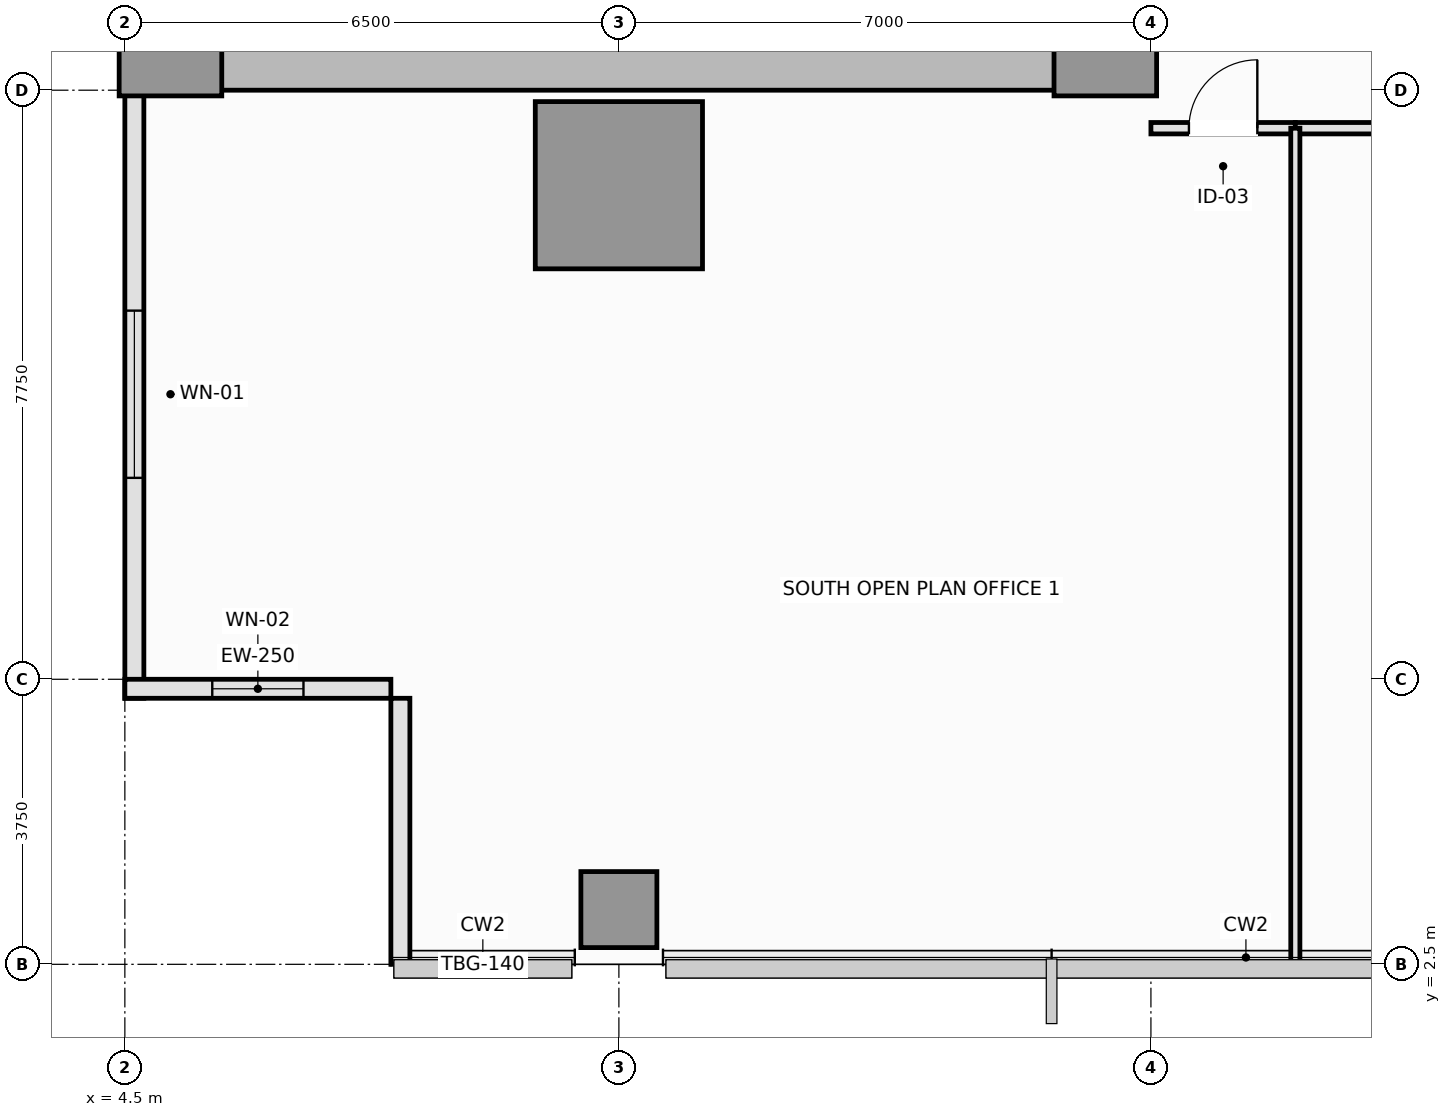
"""IFC4 building model, lengths in metres.
Left out: names, types, materials, properties, quantities, classifications, styles, units other than length and angle.
Written with IfcOpenShell. Run it as: python <this file> out.ifc"""

import sys

from ifc_helpers import new_model, si_unit, direction, frame, frame_2d, origin, origin_2d, place, context, subcontext, project, spatial, rectangle, extrude, element, fill, save


model = new_model("IFC4")
c1 = context("Model", 3, precision=1e-05, world=origin(), true_north=direction((0.0, 1.0)))
c2 = subcontext(c1, "Body", "Model", "MODEL_VIEW")
j1 = project(units=[si_unit("LENGTHUNIT", "METRE"), si_unit("PLANEANGLEUNIT", "RADIAN")], contexts=[c1])
p1 = place(None, origin())
s1 = spatial("IfcSite", under=j1, at=p1, CompositionType="ELEMENT")
p2 = place(p1, origin())
s2 = spatial("IfcBuilding", under=s1, at=p2, CompositionType="ELEMENT")
p3 = place(p2, frame((0.0, 0.0, 85.95)))
s3 = spatial("IfcBuildingStorey", under=s2, at=p3, CompositionType="ELEMENT", Elevation=85.95)
p4 = place(p3, frame((4.5, 14.4, 0.0), z_axis=(0.0, 0.0, 1.0), x_axis=(1.0, 0.0, 0.0)))
e1 = element("IfcWall", 1, at=p4, inside=s3, PredefinedType="SHEAR", context=c2, shape_type="SweptSolid", body=[
    extrude(rectangle(XDim=13.5, YDim=0.8, at=frame_2d((6.75, 0.0))), origin(), (0.0, 0.0, 1.0), 3.55),
])
for number, where, z_axis, x_axis in (
    (2, (5.1, 14.6, 0.0), (0.0, 0.0, 1.0), (1.0, 0.0, 0.0)),
    (3, (17.4, 14.6, 0.0), (0.0, 0.0, 1.0), (1.0, 0.0, 0.0)),
):
    element("IfcColumn", number, at=place(p3, frame(where, z_axis=z_axis, x_axis=x_axis)), inside=s3, PredefinedType="PILASTER", context=c2, shape_type="SweptSolid", body=[
        extrude(rectangle(XDim=1.35, YDim=1.35, at=origin_2d()), origin(), (0.0, 0.0, 1.0), 3.55),
    ])
p5 = place(p3, frame((11.0, 12.75, 0.0), z_axis=(0.0, 0.0, 1.0), x_axis=(1.0, 0.0, 0.0)))
e4 = element("IfcColumn", 4, at=p5, inside=s3, PredefinedType="COLUMN", context=c2, shape_type="SweptSolid", body=[
    extrude(rectangle(XDim=2.2, YDim=2.2, at=origin_2d()), origin(), (0.0, 0.0, 1.0), 3.55),
])
p6 = place(p3, frame((11.0, 3.22, 0.0), z_axis=(0.0, 0.0, 1.0), x_axis=(1.0, 0.0, 0.0)))
e5 = element("IfcColumn", 5, at=p6, inside=s3, PredefinedType="COLUMN", context=c2, shape_type="SweptSolid", body=[
    extrude(rectangle(XDim=1.0, YDim=1.0, at=origin_2d()), origin(), (0.0, 0.0, 1.0), 3.55),
])
p7 = place(p3, frame((4.625, 14.0, 0.0), z_axis=(0.0, 0.0, 1.0), x_axis=(0.0, -1.0, 0.0)))
e6 = element("IfcWall", 6, at=p7, inside=s3, PredefinedType="SOLIDWALL", context=c2, shape_type="SweptSolid", body=[
    extrude(rectangle(XDim=8.0, YDim=0.25, at=frame_2d((4.0, 0.0))), origin(), (0.0, 0.0, 1.0), 3.37),
])
p8 = place(p7, frame((2.9, 0.0, 0.9)))
e7 = element("IfcOpeningElement", 7, at=p8, cuts=e6, PredefinedType="OPENING", context=c2, shape_type="SweptSolid", body=[
    extrude(rectangle(XDim=2.2, YDim=1.8, at=frame_2d((1.1, 0.9))), frame((0.0, 0.135, 0.0), z_axis=(0.0, -1.0, 0.0), x_axis=(1.0, 0.0, 0.0)), (0.0, 0.0, 1.0), 0.27),
])
p9 = place(p3, frame((4.5, 6.125, 0.0), z_axis=(0.0, 0.0, 1.0), x_axis=(1.0, 0.0, 0.0)))
e8 = element("IfcWall", 8, at=p9, inside=s3, PredefinedType="SOLIDWALL", context=c2, shape_type="SweptSolid", body=[
    extrude(rectangle(XDim=3.5, YDim=0.25, at=frame_2d((1.75, 0.0))), origin(), (0.0, 0.0, 1.0), 3.37),
])
p10 = place(p9, frame((1.15, 0.0, 0.9)))
e9 = element("IfcOpeningElement", 9, at=p10, cuts=e8, PredefinedType="OPENING", context=c2, shape_type="SweptSolid", body=[
    extrude(rectangle(XDim=1.2, YDim=1.8, at=frame_2d((0.6, 0.9))), frame((0.0, 0.135, 0.0), z_axis=(0.0, -1.0, 0.0), x_axis=(1.0, 0.0, 0.0)), (0.0, 0.0, 1.0), 0.27),
])
p11 = place(p3, frame((8.125, 6.0, 0.0), z_axis=(0.0, 0.0, 1.0), x_axis=(0.0, -1.0, 0.0)))
e10 = element("IfcWall", 10, at=p11, inside=s3, PredefinedType="SOLIDWALL", context=c2, shape_type="SweptSolid", body=[
    extrude(rectangle(XDim=3.5, YDim=0.25, at=frame_2d((1.75, 0.0))), origin(), (0.0, 0.0, 1.0), 3.37),
])
p12 = place(p3, frame((18.0, 13.5, 0.0), z_axis=(0.0, 0.0, 1.0), x_axis=(1.0, 0.0, 0.0)))
e11 = element("IfcWall", 11, at=p12, inside=s3, PredefinedType="PARTITIONING", context=c2, shape_type="SweptSolid", body=[
    extrude(rectangle(XDim=1.9, YDim=0.15, at=frame_2d((0.95, 0.0))), origin(), (0.0, 0.0, 1.0), 3.37),
])
p13 = place(p12, frame((0.5, 0.0, 0.0)))
e12 = element("IfcOpeningElement", 12, at=p13, cuts=e11, PredefinedType="OPENING", context=c2, shape_type="SweptSolid", body=[
    extrude(rectangle(XDim=0.9, YDim=2.1, at=frame_2d((0.45, 1.05))), frame((0.0, 0.085, 0.0), z_axis=(0.0, -1.0, 0.0), x_axis=(1.0, 0.0, 0.0)), (0.0, 0.0, 1.0), 0.17),
])
p14 = place(p3, frame((19.9, 13.5, 0.0), z_axis=(0.0, 0.0, 1.0), x_axis=(1.0, 0.0, 0.0)))
e13 = element("IfcWall", 13, at=p14, inside=s3, PredefinedType="PARTITIONING", context=c2, shape_type="SweptSolid", body=[
    extrude(rectangle(XDim=3.7, YDim=0.15, at=frame_2d((1.85, 0.0))), origin(), (0.0, 0.0, 1.0), 3.37),
])
p15 = place(p14, frame((1.35, 0.0, 0.0)))
e14 = element("IfcOpeningElement", 14, at=p15, cuts=e13, PredefinedType="OPENING", context=c2, shape_type="SweptSolid", body=[
    extrude(rectangle(XDim=1.0, YDim=2.15, at=frame_2d((0.5, 1.075))), frame((0.0, 0.085, 0.0), z_axis=(0.0, -1.0, 0.0), x_axis=(1.0, 0.0, 0.0)), (0.0, 0.0, 1.0), 0.17),
])
p16 = place(p3, frame((19.9, 2.51, 0.0), z_axis=(0.0, 0.0, 1.0), x_axis=(0.0, 1.0, 0.0)))
e15 = element("IfcWall", 15, at=p16, inside=s3, PredefinedType="PARTITIONING", context=c2, shape_type="SweptSolid", body=[
    extrude(rectangle(XDim=10.99, YDim=0.12, at=frame_2d((5.495, 0.0))), origin(), (0.0, 0.0, 1.0), 3.37),
])
p17 = place(p8, origin())
e16 = element("IfcWindow", 16, at=p17, inside=s3, PartitioningType="SINGLE_PANEL", PredefinedType="WINDOW", context=c2, shape_type="SweptSolid", body=[
    extrude(rectangle(XDim=2.2, YDim=1.8, at=frame_2d((1.1, 0.9))), frame((0.0, 0.03, 0.0), z_axis=(0.0, -1.0, 0.0), x_axis=(1.0, 0.0, 0.0)), (0.0, 0.0, 1.0), 0.06),
])
fill(e7, e16)
p18 = place(p10, origin())
e17 = element("IfcWindow", 17, at=p18, inside=s3, PartitioningType="SINGLE_PANEL", PredefinedType="WINDOW", context=c2, shape_type="SweptSolid", body=[
    extrude(rectangle(XDim=1.2, YDim=1.8, at=frame_2d((0.6, 0.9))), frame((0.0, 0.03, 0.0), z_axis=(0.0, -1.0, 0.0), x_axis=(1.0, 0.0, 0.0)), (0.0, 0.0, 1.0), 0.06),
])
fill(e9, e17)
p19 = place(p13, origin())
e18 = element("IfcDoor", 18, at=p19, inside=s3, OperationType="SINGLE_SWING_RIGHT", PredefinedType="DOOR", context=c2, shape_type="SweptSolid", body=[
    extrude(rectangle(XDim=0.9, YDim=2.1, at=frame_2d((0.45, 1.05))), frame((0.0, 0.025, 0.0), z_axis=(0.0, -1.0, 0.0), x_axis=(1.0, 0.0, 0.0)), (0.0, 0.0, 1.0), 0.05),
])
fill(e12, e18)
save(model, sys.argv[1])
